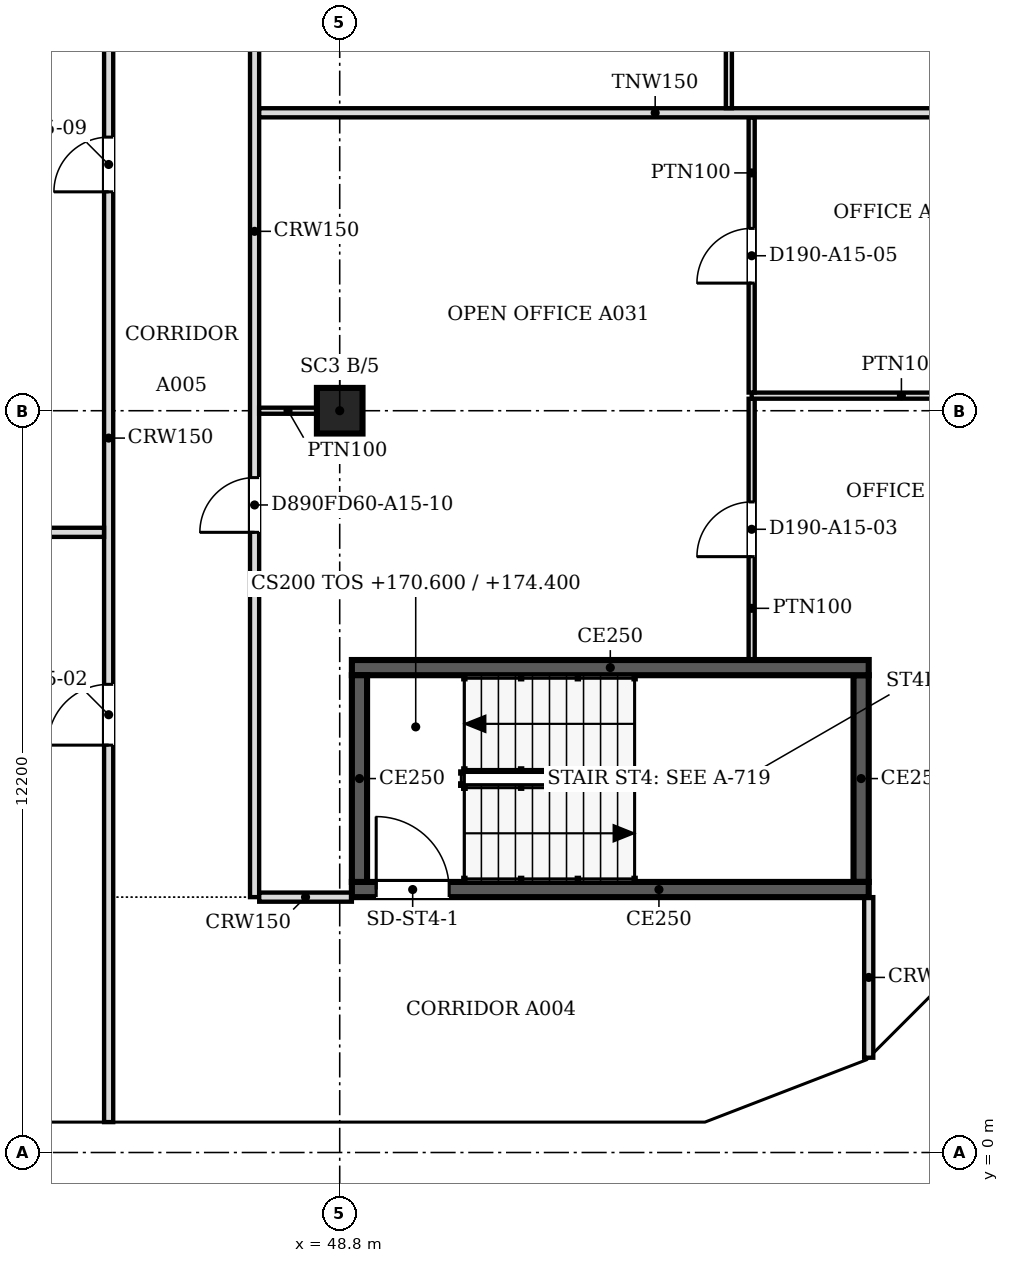
"""IFC4 building model, lengths in metres.
Left out: names, types, materials, properties, quantities, classifications, styles, units other than length and angle.
Written with IfcOpenShell. Run it as: python <this file> out.ifc"""

import sys

from ifc_helpers import new_model, si_unit, direction, frame, frame_2d, origin, origin_2d, place, context, subcontext, project, spatial, polyline, rectangle, outline, extrude, faceted_brep, source, transform, mapped, element, fill, save


model = new_model("IFC4")
c1 = context("Model", 3, precision=1e-05, world=origin(), true_north=direction((0.0, 1.0)))
c2 = subcontext(c1, "Body", "Model", "MODEL_VIEW")
j1 = project(units=[si_unit("LENGTHUNIT", "METRE"), si_unit("PLANEANGLEUNIT", "RADIAN")], contexts=[c1])
p1 = place(None, origin())
s1 = spatial("IfcSite", under=j1, at=p1, CompositionType="ELEMENT")
p2 = place(p1, origin())
s2 = spatial("IfcBuilding", under=s1, at=p2, CompositionType="ELEMENT")
p3 = place(p2, frame((0.0, 0.0, 170.6)))
s3 = spatial("IfcBuildingStorey", under=s2, at=p3, CompositionType="ELEMENT", Elevation=170.6)
p4 = place(p3, frame((48.8, 12.2, 0.0), z_axis=(0.0, 0.0, 1.0), x_axis=(1.0, 0.0, 0.0)))
e1 = element("IfcColumn", 1, at=p4, inside=s3, PredefinedType="COLUMN", context=c2, shape_type="SweptSolid", body=[
    extrude(rectangle(XDim=0.75, YDim=0.75, at=origin_2d()), origin(), (0.0, 0.0, 1.0), 3.6),
])
m1 = source(origin(), c2, "Body", "SweptSolid", [
    extrude(outline(polyline([(3.05, 0.0), (6.1, 3.8), (3.05, 7.6), (0.0, 3.8), (3.05, 0.0)])), frame((0.0, 0.25, 0.0), z_axis=(0.0, -1.0, 0.0), x_axis=(1.0, 0.0, 0.0)), (0.0, 0.0, 1.0), 0.5),
])
p5 = place(p3, frame((39.65, 0.25, -3.8), z_axis=(0.0, 0.0, 1.0), x_axis=(1.0, 0.0, 0.0)))
e2 = element("IfcWall", 2, at=p5, inside=s3, PredefinedType="SOLIDWALL", context=c2, shape_type="MappedRepresentation", body=[
    mapped(m1, transform((0.0, 0.0, 0.0), scale=1.0)),
])
m2 = source(origin(), c2, "Body", "SweptSolid", [
    extrude(outline(polyline([(3.05, 0.399), (5.78, 3.8), (3.05, 7.2), (0.321, 3.8), (3.05, 0.399)])), frame((0.0, 0.26, 0.0), z_axis=(0.0, -1.0, 0.0), x_axis=(1.0, 0.0, 0.0)), (0.0, 0.0, 1.0), 0.52),
])
p6 = place(p5, origin())
e3 = element("IfcOpeningElement", 3, at=p6, cuts=e2, PredefinedType="OPENING", context=c2, shape_type="MappedRepresentation", body=[
    mapped(m2, transform((0.0, 0.0, 0.0), scale=1.0)),
])
p7 = place(p3, frame((45.75, 0.25, -3.8), z_axis=(0.0, 0.0, 1.0), x_axis=(1.0, 0.0, 0.0)))
e4 = element("IfcWall", 4, at=p7, inside=s3, PredefinedType="SOLIDWALL", context=c2, shape_type="MappedRepresentation", body=[
    mapped(m1, transform((0.0, 0.0, 0.0), scale=1.0)),
])
p8 = place(p7, origin())
e5 = element("IfcOpeningElement", 5, at=p8, cuts=e4, PredefinedType="OPENING", context=c2, shape_type="MappedRepresentation", body=[
    mapped(m2, transform((0.0, 0.0, 0.0), scale=1.0)),
])
m3 = source(origin(), c2, "Body", "Brep", [
    faceted_brep([(3.003, -0.25, 0.0), (3.05, -0.25, 0.06), (3.05, -0.25, 7.54), (3.003, -0.25, 7.6), (0.0, -0.25, 3.8), (0.0, 0.25, 3.8), (2.957, 0.25, 7.541), (2.957, 0.25, 0.059), (3.003, 0.0, 0.0), (3.003, 0.0, 7.6)], [[[0, 1, 2, 3, 4]], [[5, 6, 7]], [[1, 0, 8]], [[9, 3, 2]], [[6, 5, 4, 3, 9]], [[5, 7, 8, 0, 4]], [[1, 8, 7, 6, 9, 2]]]),
])
p9 = place(p3, frame((51.85, 0.25, -3.8), z_axis=(0.0, 0.0, 1.0), x_axis=(1.0, 0.0, 0.0)))
e6 = element("IfcWall", 6, at=p9, inside=s3, PredefinedType="SOLIDWALL", context=c2, shape_type="MappedRepresentation", body=[
    mapped(m3, transform((0.0, 0.0, 0.0), scale=1.0)),
])
m4 = source(origin(), c2, "Body", "SweptSolid", [
    extrude(outline(polyline([(2.803, 6.944), (0.319, 3.8), (2.803, 0.656), (2.803, 6.944)])), frame((0.0, 0.26, 0.0), z_axis=(0.0, -1.0, 0.0), x_axis=(1.0, 0.0, 0.0)), (0.0, 0.0, 1.0), 0.52),
])
p10 = place(p9, origin())
e7 = element("IfcOpeningElement", 7, at=p10, cuts=e6, PredefinedType="OPENING", context=c2, shape_type="MappedRepresentation", body=[
    mapped(m4, transform((0.0, 0.0, 0.0), scale=1.0)),
])
m5 = source(origin(), c2, "Body", "Brep", [
    faceted_brep([(0.047, -0.25, 0.0), (2.997, -0.25, 3.8), (0.047, -0.25, 7.6), (0.0, -0.25, 7.541), (0.0, -0.25, 0.059), (0.093, 0.25, 7.54), (2.944, 0.25, 3.868), (2.944, 0.25, 3.732), (0.093, 0.25, 0.06), (2.997, 0.0, 3.8), (0.047, 0.0, 0.0), (0.047, 0.0, 7.6)], [[[0, 1, 2, 3, 4]], [[5, 6, 7, 8]], [[8, 7, 9, 1, 0, 10]], [[6, 5, 11, 2, 1, 9]], [[3, 2, 11]], [[10, 0, 4]], [[8, 10, 4, 3, 11, 5]], [[7, 6, 9]]]),
])
p11 = place(p3, frame((54.81, 0.233, -3.8), z_axis=(0.0, 0.0, 1.0), x_axis=(0.932990326376, 0.359901446078, 0.0)))
e8 = element("IfcWall", 8, at=p11, inside=s3, PredefinedType="SOLIDWALL", context=c2, shape_type="MappedRepresentation", body=[
    mapped(m5, transform((0.0, 0.0, 0.0), scale=1.0)),
])
m6 = source(origin(), c2, "Body", "SweptSolid", [
    extrude(outline(polyline([(0.247, 0.665), (2.681, 3.8), (0.247, 6.935), (0.247, 0.665)])), frame((0.0, 0.26, 0.0), z_axis=(0.0, -1.0, 0.0), x_axis=(1.0, 0.0, 0.0)), (0.0, 0.0, 1.0), 0.52),
])
p12 = place(p11, origin())
e9 = element("IfcOpeningElement", 9, at=p12, cuts=e8, PredefinedType="OPENING", context=c2, shape_type="MappedRepresentation", body=[
    mapped(m6, transform((0.0, 0.0, 0.0), scale=1.0)),
])
m7 = source(origin(), c2, "Body", "Brep", [
    faceted_brep([(2.944, -0.25, 0.0), (2.997, -0.25, 0.068), (2.997, -0.25, 7.532), (2.944, -0.25, 7.6), (0.0, -0.25, 3.8), (0.053, 0.25, 3.868), (2.891, 0.25, 7.532), (2.891, 0.25, 0.068), (0.053, 0.25, 3.732), (2.944, 0.0, 0.0), (2.944, 0.0, 7.6), (0.0, 0.0, 3.8)], [[[0, 1, 2, 3, 4]], [[5, 6, 7, 8]], [[1, 0, 9]], [[10, 3, 2]], [[6, 5, 11, 4, 3, 10]], [[8, 7, 9, 0, 4, 11]], [[8, 11, 5]], [[1, 9, 7, 6, 10, 2]]]),
])
p13 = place(p3, frame((57.606, 1.312, -3.8), z_axis=(0.0, 0.0, 1.0), x_axis=(0.707147509625, 0.707066050402, 0.0)))
e10 = element("IfcWall", 10, at=p13, inside=s3, PredefinedType="SOLIDWALL", context=c2, shape_type="MappedRepresentation", body=[
    mapped(m7, transform((0.0, 0.0, 0.0), scale=1.0)),
])
m8 = source(origin(), c2, "Body", "SweptSolid", [
    extrude(outline(polyline([(2.744, 6.934), (0.316, 3.8), (2.744, 0.666), (2.744, 6.934)])), frame((0.0, 0.26, 0.0), z_axis=(0.0, -1.0, 0.0), x_axis=(1.0, 0.0, 0.0)), (0.0, 0.0, 1.0), 0.52),
])
p14 = place(p13, origin())
e11 = element("IfcOpeningElement", 11, at=p14, cuts=e10, PredefinedType="OPENING", context=c2, shape_type="MappedRepresentation", body=[
    mapped(m8, transform((0.0, 0.0, 0.0), scale=1.0)),
])
p15 = place(p2, frame((0.0, 0.0, 174.4)))
s4 = spatial("IfcBuildingStorey", under=s2, at=p15, CompositionType="ELEMENT", Elevation=174.4)
m9 = source(origin(), c2, "Body", "SweptSolid", [
    extrude(outline(polyline([(3.05, 0.0), (6.1, 3.8), (3.05, 7.6), (0.0, 3.8), (3.05, 0.0)])), frame((0.0, 0.25, 0.0), z_axis=(0.0, -1.0, 0.0), x_axis=(1.0, 0.0, 0.0)), (0.0, 0.0, 1.0), 0.5),
])
p16 = place(p15, frame((42.7, 0.25, -3.8), z_axis=(0.0, 0.0, 1.0), x_axis=(1.0, 0.0, 0.0)))
e12 = element("IfcWall", 12, at=p16, inside=s4, PredefinedType="SOLIDWALL", context=c2, shape_type="MappedRepresentation", body=[
    mapped(m9, transform((0.0, 0.0, 0.0), scale=1.0)),
])
m10 = source(origin(), c2, "Body", "SweptSolid", [
    extrude(outline(polyline([(3.05, 0.399), (5.78, 3.8), (3.05, 7.2), (0.321, 3.8), (3.05, 0.399)])), frame((0.0, 0.26, 0.0), z_axis=(0.0, -1.0, 0.0), x_axis=(1.0, 0.0, 0.0)), (0.0, 0.0, 1.0), 0.52),
])
p17 = place(p16, origin())
e13 = element("IfcOpeningElement", 13, at=p17, cuts=e12, PredefinedType="OPENING", context=c2, shape_type="MappedRepresentation", body=[
    mapped(m10, transform((0.0, 0.0, 0.0), scale=1.0)),
])
m11 = source(origin(), c2, "Body", "Brep", [
    faceted_brep([(3.05, -0.25, 0.0), (6.053, -0.25, 3.8), (3.05, -0.25, 7.6), (0.0, -0.25, 3.8), (0.0, 0.25, 3.8), (3.05, 0.25, 7.6), (6.007, 0.25, 3.859), (6.007, 0.25, 3.741), (3.05, 0.25, 0.0), (6.053, 0.0, 3.8)], [[[0, 1, 2, 3]], [[4, 5, 6, 7, 8]], [[8, 7, 9, 1, 0]], [[6, 5, 2, 1, 9]], [[5, 4, 3, 2]], [[4, 8, 0, 3]], [[9, 7, 6]]]),
])
p18 = place(p15, frame((48.8, 0.25, -3.8), z_axis=(0.0, 0.0, 1.0), x_axis=(1.0, 0.0, 0.0)))
e14 = element("IfcWall", 14, at=p18, inside=s4, PredefinedType="SOLIDWALL", context=c2, shape_type="MappedRepresentation", body=[
    mapped(m11, transform((0.0, 0.0, 0.0), scale=1.0)),
])
m12 = source(origin(), c2, "Body", "SweptSolid", [
    extrude(outline(polyline([(3.049, 0.401), (5.735, 3.8), (3.049, 7.199), (0.321, 3.8), (3.049, 0.401)])), frame((0.0, 0.26, 0.0), z_axis=(0.0, -1.0, 0.0), x_axis=(1.0, 0.0, 0.0)), (0.0, 0.0, 1.0), 0.52),
])
p19 = place(p18, origin())
e15 = element("IfcOpeningElement", 15, at=p19, cuts=e14, PredefinedType="OPENING", context=c2, shape_type="MappedRepresentation", body=[
    mapped(m12, transform((0.0, 0.0, 0.0), scale=1.0)),
])
m13 = source(origin(), c2, "Body", "Brep", [
    faceted_brep([(2.95, -0.25, 0.0), (3.003, -0.25, 0.068), (3.003, -0.25, 7.531), (2.95, -0.25, 7.6), (0.0, -0.25, 3.8), (0.047, 0.25, 3.86), (2.898, 0.25, 7.532), (2.898, 0.25, 0.068), (0.047, 0.25, 3.74), (2.95, 0.0, 0.0), (2.95, 0.0, 7.6), (0.0, 0.0, 3.8)], [[[0, 1, 2, 3, 4]], [[5, 6, 7, 8]], [[1, 0, 9]], [[10, 3, 2]], [[6, 5, 11, 4, 3, 10]], [[8, 7, 9, 0, 4, 11]], [[8, 11, 5]], [[1, 9, 7, 6, 10, 2]]]),
])
p20 = place(p15, frame((54.854, 0.25, -3.8), z_axis=(0.0, 0.0, 1.0), x_axis=(0.932970071518, 0.359953949349, 0.0)))
e16 = element("IfcWall", 16, at=p20, inside=s4, PredefinedType="SOLIDWALL", context=c2, shape_type="MappedRepresentation", body=[
    mapped(m13, transform((0.0, 0.0, 0.0), scale=1.0)),
])
m14 = source(origin(), c2, "Body", "SweptSolid", [
    extrude(outline(polyline([(2.75, 6.935), (0.316, 3.8), (2.75, 0.665), (2.75, 6.935)])), frame((0.0, 0.26, 0.0), z_axis=(0.0, -1.0, 0.0), x_axis=(1.0, 0.0, 0.0)), (0.0, 0.0, 1.0), 0.52),
])
p21 = place(p20, origin())
e17 = element("IfcOpeningElement", 17, at=p21, cuts=e16, PredefinedType="OPENING", context=c2, shape_type="MappedRepresentation", body=[
    mapped(m14, transform((0.0, 0.0, 0.0), scale=1.0)),
])
m15 = source(origin(), c2, "Body", "Brep", [
    faceted_brep([(0.053, -0.25, 0.0), (2.997, -0.25, 3.8), (0.053, -0.25, 7.6), (0.0, -0.25, 7.532), (0.0, -0.25, 0.068), (0.106, 0.25, 7.531), (2.944, 0.25, 3.868), (2.944, 0.25, 3.732), (0.106, 0.25, 0.068), (2.997, 0.0, 3.8), (0.053, 0.0, 0.0), (0.053, 0.0, 7.6)], [[[0, 1, 2, 3, 4]], [[5, 6, 7, 8]], [[8, 7, 9, 1, 0, 10]], [[6, 5, 11, 2, 1, 9]], [[3, 2, 11]], [[10, 0, 4]], [[8, 10, 4, 3, 11, 5]], [[9, 7, 6]]]),
])
p22 = place(p15, frame((57.569, 1.274, -3.8), z_axis=(0.0, 0.0, 1.0), x_axis=(0.707066050402, 0.707147509625, 0.0)))
e18 = element("IfcWall", 18, at=p22, inside=s4, PredefinedType="SOLIDWALL", context=c2, shape_type="MappedRepresentation", body=[
    mapped(m15, transform((0.0, 0.0, 0.0), scale=1.0)),
])
m16 = source(origin(), c2, "Body", "SweptSolid", [
    extrude(outline(polyline([(0.253, 0.666), (2.681, 3.8), (0.253, 6.934), (0.253, 0.666)])), frame((0.0, 0.26, 0.0), z_axis=(0.0, -1.0, 0.0), x_axis=(1.0, 0.0, 0.0)), (0.0, 0.0, 1.0), 0.52),
])
p23 = place(p22, origin())
e19 = element("IfcOpeningElement", 19, at=p23, cuts=e18, PredefinedType="OPENING", context=c2, shape_type="MappedRepresentation", body=[
    mapped(m16, transform((0.0, 0.0, 0.0), scale=1.0)),
])
p24 = place(p3, frame((57.5, 4.325, 0.0), z_axis=(0.0, 0.0, 1.0), x_axis=(-1.0, 0.0, 0.0)))
e20 = element("IfcWall", 20, at=p24, inside=s3, PredefinedType="SOLIDWALL", context=c2, shape_type="SweptSolid", body=[
    extrude(rectangle(XDim=8.5, YDim=0.25, at=frame_2d((4.25, 0.0))), origin(), (0.0, 0.0, 1.0), 3.8),
])
m17 = source(origin(), c2, "Body", "SweptSolid", [
    extrude(rectangle(XDim=1.2, YDim=2.1, at=frame_2d((0.6, 1.05))), frame((0.0, 0.135, 0.0), z_axis=(0.0, -1.0, 0.0), x_axis=(1.0, 0.0, 0.0)), (0.0, 0.0, 1.0), 0.27),
])
p25 = place(p24, frame((6.9, 0.0, 0.0)))
e21 = element("IfcOpeningElement", 21, at=p25, cuts=e20, PredefinedType="OPENING", context=c2, shape_type="MappedRepresentation", body=[
    mapped(m17, transform((0.0, 0.0, 0.0), scale=1.0)),
])
p26 = place(p3, frame((49.125, 4.45, 0.0), z_axis=(0.0, 0.0, 1.0), x_axis=(0.0, 1.0, 0.0)))
e22 = element("IfcWall", 22, at=p26, inside=s3, PredefinedType="SOLIDWALL", context=c2, shape_type="SweptSolid", body=[
    extrude(rectangle(XDim=3.4, YDim=0.25, at=frame_2d((1.7, 0.0))), origin(), (0.0, 0.0, 1.0), 3.8),
])
p27 = place(p3, frame((49.0, 7.975, 0.0), z_axis=(0.0, 0.0, 1.0), x_axis=(1.0, 0.0, 0.0)))
e23 = element("IfcWall", 23, at=p27, inside=s3, PredefinedType="SOLIDWALL", context=c2, shape_type="SweptSolid", body=[
    extrude(rectangle(XDim=8.5, YDim=0.25, at=frame_2d((4.25, 0.0))), origin(), (0.0, 0.0, 1.0), 3.8),
])
p28 = place(p3, frame((57.375, 7.85, 0.0), z_axis=(0.0, 0.0, 1.0), x_axis=(0.0, -1.0, 0.0)))
e24 = element("IfcWall", 24, at=p28, inside=s3, PredefinedType="SOLIDWALL", context=c2, shape_type="SweptSolid", body=[
    extrude(rectangle(XDim=3.4, YDim=0.25, at=frame_2d((1.7, 0.0))), origin(), (0.0, 0.0, 1.0), 3.8),
])
p29 = place(p3, frame((45.0, 0.5, 0.0), z_axis=(0.0, 0.0, 1.0), x_axis=(0.0, 1.0, 0.0)))
e25 = element("IfcWall", 25, at=p29, inside=s3, PredefinedType="PARTITIONING", context=c2, shape_type="SweptSolid", body=[
    extrude(rectangle(XDim=21.724, YDim=0.15, at=frame_2d((10.862, 0.0))), origin(), (0.0, 0.0, 1.0), 3.067),
])
m18 = source(origin(), c2, "Body", "SweptSolid", [
    extrude(rectangle(XDim=1.0, YDim=2.1, at=frame_2d((0.5, 1.05))), frame((0.0, 0.085, 0.0), z_axis=(0.0, -1.0, 0.0), x_axis=(1.0, 0.0, 0.0)), (0.0, 0.0, 1.0), 0.17),
])
p30 = place(p29, frame((6.2, 0.0, 0.0)))
e26 = element("IfcOpeningElement", 26, at=p30, cuts=e25, PredefinedType="OPENING", context=c2, shape_type="MappedRepresentation", body=[
    mapped(m18, transform((0.0, 0.0, 0.0), scale=1.0)),
])
m19 = source(origin(), c2, "Body", "SweptSolid", [
    extrude(rectangle(XDim=0.9, YDim=2.1, at=frame_2d((0.45, 1.05))), frame((0.0, 0.085, 0.0), z_axis=(0.0, -1.0, 0.0), x_axis=(1.0, 0.0, 0.0)), (0.0, 0.0, 1.0), 0.17),
])
p31 = place(p29, frame((15.3, 0.0, 0.0)))
e27 = element("IfcOpeningElement", 27, at=p31, cuts=e25, PredefinedType="OPENING", context=c2, shape_type="MappedRepresentation", body=[
    mapped(m19, transform((0.0, 0.0, 0.0), scale=1.0)),
])
p32 = place(p3, frame((57.5, 1.559, 0.0), z_axis=(0.0, 0.0, 1.0), x_axis=(0.0, 1.0, 0.0)))
e28 = element("IfcWall", 28, at=p32, inside=s3, PredefinedType="PARTITIONING", context=c2, shape_type="SweptSolid", body=[
    extrude(rectangle(XDim=2.641, YDim=0.15, at=frame_2d((1.32, 0.0))), origin(), (0.0, 0.0, 1.0), 3.067),
])
p33 = place(p3, frame((47.4, 22.224, 0.0), z_axis=(0.0, 0.0, 1.0), x_axis=(0.0, -1.0, 0.0)))
e29 = element("IfcWall", 29, at=p33, inside=s3, PredefinedType="PARTITIONING", context=c2, shape_type="SweptSolid", body=[
    extrude(rectangle(XDim=18.024, YDim=0.15, at=frame_2d((9.012, 0.0))), origin(), (0.0, 0.0, 1.0), 3.067),
])
p34 = place(p33, frame((2.123, 0.0, 0.0)))
e30 = element("IfcOpeningElement", 30, at=p34, cuts=e29, PredefinedType="OPENING", context=c2, shape_type="MappedRepresentation", body=[
    mapped(m19, transform((0.0, 0.0, 0.0), scale=1.0)),
])
p35 = place(p33, frame((11.124, 0.0, 0.0)))
e31 = element("IfcOpeningElement", 31, at=p35, cuts=e29, PredefinedType="OPENING", context=c2, shape_type="MappedRepresentation", body=[
    mapped(m19, transform((0.0, 0.0, 0.0), scale=1.0)),
])
p36 = place(p3, frame((47.476, 4.2, 0.0), z_axis=(0.0, 0.0, 1.0), x_axis=(1.0, 0.0, 0.0)))
e32 = element("IfcWall", 32, at=p36, inside=s3, PredefinedType="PARTITIONING", context=c2, shape_type="SweptSolid", body=[
    extrude(rectangle(XDim=1.524, YDim=0.15, at=frame_2d((0.762, 0.0))), origin(), (0.0, 0.0, 1.0), 3.067),
])
p37 = place(p3, frame((55.575, 12.397, 0.0), z_axis=(0.0, 0.0, 1.0), x_axis=(0.0, -1.0, 0.0)))
e33 = element("IfcWall", 33, at=p37, inside=s3, PredefinedType="PARTITIONING", context=c2, shape_type="SweptSolid", body=[
    extrude(rectangle(XDim=4.297, YDim=0.1, at=frame_2d((2.148, 0.0))), origin(), (0.0, 0.0, 1.0), 3.067),
])
m20 = source(origin(), c2, "Body", "SweptSolid", [
    extrude(rectangle(XDim=0.9, YDim=2.1, at=frame_2d((0.45, 1.05))), frame((0.0, 0.06, 0.0), z_axis=(0.0, -1.0, 0.0), x_axis=(1.0, 0.0, 0.0)), (0.0, 0.0, 1.0), 0.12),
])
p38 = place(p37, frame((1.697, 0.0, 0.0)))
e34 = element("IfcOpeningElement", 34, at=p38, cuts=e33, PredefinedType="OPENING", context=c2, shape_type="MappedRepresentation", body=[
    mapped(m20, transform((0.0, 0.0, 0.0), scale=1.0)),
])
p39 = place(p3, frame((27.5, 10.2, 0.0), z_axis=(0.0, 0.0, 1.0), x_axis=(1.0, 0.0, 0.0)))
e35 = element("IfcWall", 35, at=p39, inside=s3, PredefinedType="PARTITIONING", context=c2, shape_type="SweptSolid", body=[
    extrude(rectangle(XDim=17.424, YDim=0.15, at=frame_2d((8.712, 0.0))), origin(), (0.0, 0.0, 1.0), 3.067),
])
p40 = place(p3, frame((48.425, 12.2, 0.0), z_axis=(0.0, 0.0, 1.0), x_axis=(-1.0, 0.0, 0.0)))
e36 = element("IfcWall", 36, at=p40, inside=s3, PredefinedType="PARTITIONING", context=c2, shape_type="SweptSolid", body=[
    extrude(rectangle(XDim=0.95, YDim=0.1, at=frame_2d((0.475, 0.0))), origin(), (0.0, 0.0, 1.0), 3.067),
])
p41 = place(p3, frame((55.575, 12.448, 0.0), z_axis=(0.0, 0.0, 1.0), x_axis=(1.0, 0.0, 0.0)))
e37 = element("IfcWall", 37, at=p41, inside=s3, PredefinedType="PARTITIONING", context=c2, shape_type="SweptSolid", body=[
    extrude(rectangle(XDim=4.925, YDim=0.1, at=frame_2d((2.462, 0.0))), origin(), (0.0, 0.0, 1.0), 3.067),
])
p42 = place(p3, frame((55.575, 17.024, 0.0), z_axis=(0.0, 0.0, 1.0), x_axis=(0.0, -1.0, 0.0)))
e38 = element("IfcWall", 38, at=p42, inside=s3, PredefinedType="PARTITIONING", context=c2, shape_type="SweptSolid", body=[
    extrude(rectangle(XDim=4.525, YDim=0.1, at=frame_2d((2.263, 0.0))), origin(), (0.0, 0.0, 1.0), 3.067),
])
p43 = place(p42, frame((1.825, 0.0, 0.0)))
e39 = element("IfcOpeningElement", 39, at=p43, cuts=e38, PredefinedType="OPENING", context=c2, shape_type="MappedRepresentation", body=[
    mapped(m20, transform((0.0, 0.0, 0.0), scale=1.0)),
])
p44 = place(p3, frame((47.476, 17.1, 0.0), z_axis=(0.0, 0.0, 1.0), x_axis=(1.0, 0.0, 0.0)))
e40 = element("IfcWall", 40, at=p44, inside=s3, PredefinedType="PARTITIONING", context=c2, shape_type="SweptSolid", body=[
    extrude(rectangle(XDim=13.024, YDim=0.15, at=frame_2d((6.512, 0.0))), origin(), (0.0, 0.0, 1.0), 3.067),
])
p45 = place(p3, frame((55.2, 22.224, 0.0), z_axis=(0.0, 0.0, 1.0), x_axis=(0.0, -1.0, 0.0)))
e41 = element("IfcWall", 41, at=p45, inside=s3, PredefinedType="PARTITIONING", context=c2, shape_type="SweptSolid", body=[
    extrude(rectangle(XDim=5.048, YDim=0.1, at=frame_2d((2.524, 0.0))), origin(), (0.0, 0.0, 1.0), 3.067),
])
p46 = place(p45, frame((2.048, 0.0, 0.0)))
e42 = element("IfcOpeningElement", 42, at=p46, cuts=e41, PredefinedType="OPENING", context=c2, shape_type="MappedRepresentation", body=[
    mapped(m20, transform((0.0, 0.0, 0.0), scale=1.0)),
])
m21 = source(origin(), c2, "Body", "SweptSolid", [
    extrude(rectangle(XDim=1.2, YDim=2.1, at=frame_2d((0.6, 1.05))), frame((0.0, 0.025, 0.0), z_axis=(0.0, -1.0, 0.0), x_axis=(1.0, 0.0, 0.0)), (0.0, 0.0, 1.0), 0.05),
])
p47 = place(p25, origin())
e43 = element("IfcDoor", 43, at=p47, inside=s3, OperationType="SINGLE_SWING_RIGHT", PredefinedType="DOOR", context=c2, shape_type="MappedRepresentation", body=[
    mapped(m21, transform((0.0, 0.0, 0.0), scale=1.0)),
])
fill(e21, e43)
m22 = source(origin(), c2, "Body", "SweptSolid", [
    extrude(rectangle(XDim=0.9, YDim=2.1, at=frame_2d((0.45, 1.05))), frame((0.0, 0.025, 0.0), z_axis=(0.0, -1.0, 0.0), x_axis=(1.0, 0.0, 0.0)), (0.0, 0.0, 1.0), 0.05),
])
p48 = place(p38, origin())
e44 = element("IfcDoor", 44, at=p48, inside=s3, OperationType="SINGLE_SWING_RIGHT", PredefinedType="DOOR", context=c2, shape_type="MappedRepresentation", body=[
    mapped(m22, transform((0.0, 0.0, 0.0), scale=1.0)),
])
fill(e34, e44)
p49 = place(p43, origin())
e45 = element("IfcDoor", 45, at=p49, inside=s3, OperationType="SINGLE_SWING_RIGHT", PredefinedType="DOOR", context=c2, shape_type="MappedRepresentation", body=[
    mapped(m22, transform((0.0, 0.0, 0.0), scale=1.0)),
])
fill(e39, e45)
m23 = source(origin(), c2, "Body", "SweptSolid", [
    extrude(rectangle(XDim=1.0, YDim=2.1, at=frame_2d((0.5, 1.05))), frame((0.0, 0.025, 0.0), z_axis=(0.0, -1.0, 0.0), x_axis=(1.0, 0.0, 0.0)), (0.0, 0.0, 1.0), 0.05),
])
p50 = place(p30, origin())
e46 = element("IfcDoor", 46, at=p50, inside=s3, OperationType="SINGLE_SWING_LEFT", PredefinedType="DOOR", context=c2, shape_type="MappedRepresentation", body=[
    mapped(m23, transform((0.0, 0.0, 0.0), scale=1.0)),
])
fill(e26, e46)
p51 = place(p31, origin())
e47 = element("IfcDoor", 47, at=p51, inside=s3, OperationType="SINGLE_SWING_LEFT", PredefinedType="DOOR", context=c2, shape_type="MappedRepresentation", body=[
    mapped(m22, transform((0.0, 0.0, 0.0), scale=1.0)),
])
fill(e27, e47)
p52 = place(p35, origin())
e48 = element("IfcDoor", 48, at=p52, inside=s3, OperationType="SINGLE_SWING_RIGHT", PredefinedType="DOOR", context=c2, shape_type="MappedRepresentation", body=[
    mapped(m22, transform((0.0, 0.0, 0.0), scale=1.0)),
])
fill(e31, e48)
save(model, sys.argv[1])
